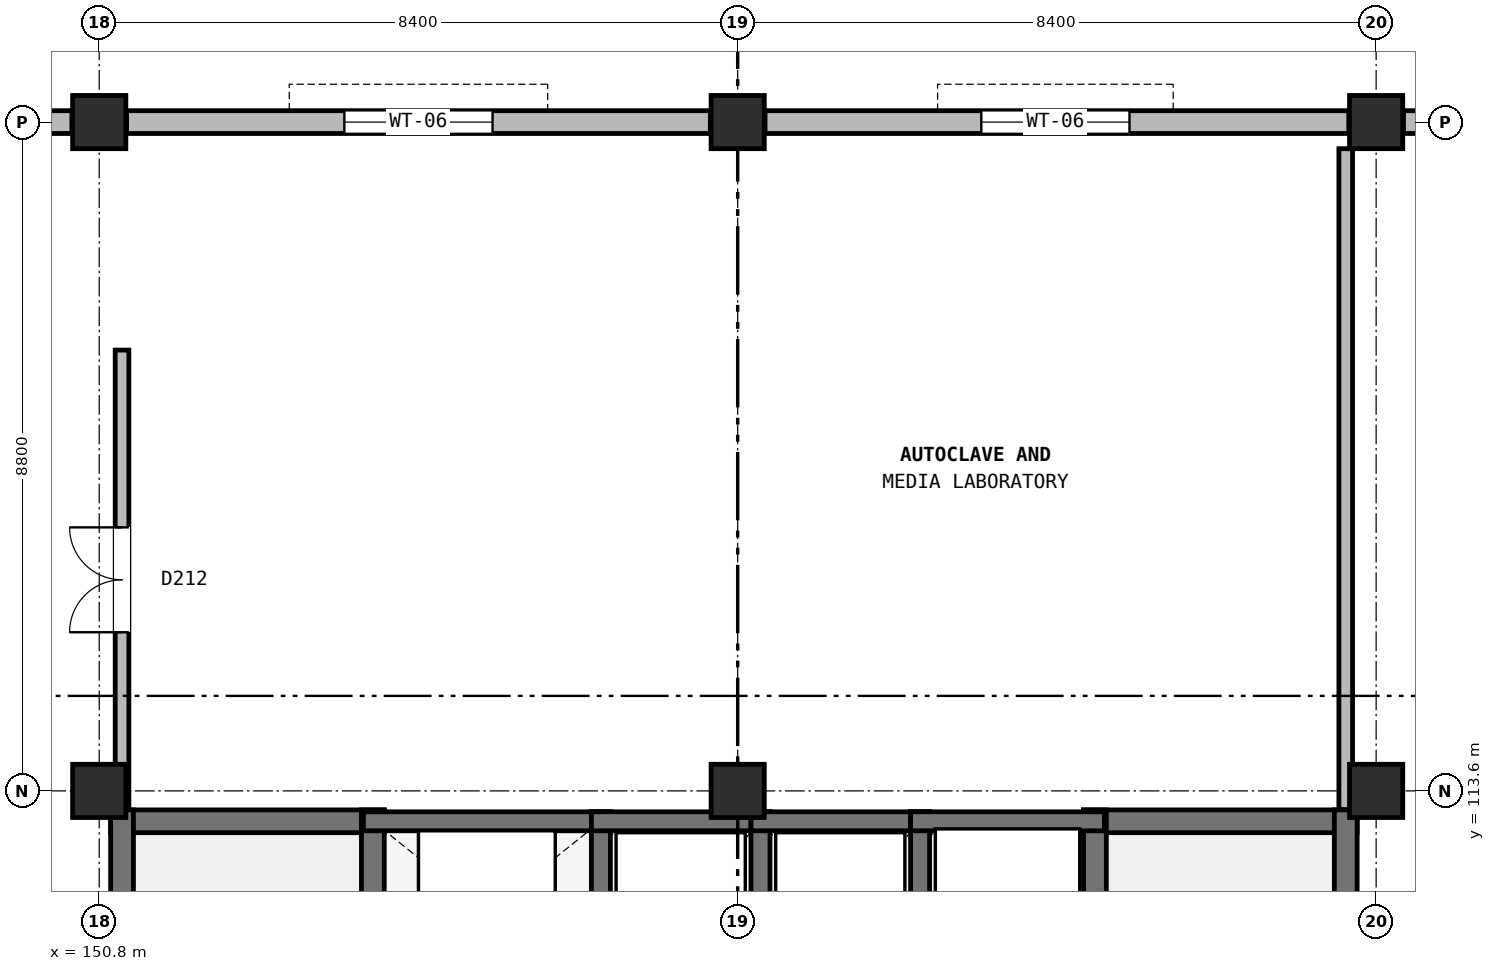
"""IFC4 building model, lengths in metres.
Left out: names, types, materials, properties, quantities, classifications, styles, units other than length and angle.
Written with IfcOpenShell. Run it as: python <this file> out.ifc"""

import sys

from ifc_helpers import new_model, si_unit, direction, frame, frame_2d, origin, origin_2d, place, context, subcontext, project, spatial, rectangle, extrude, element, fill, save


model = new_model("IFC4")
c1 = context("Model", 3, precision=1e-05, world=origin(), true_north=direction((0.0, 1.0)))
c2 = subcontext(c1, "Body", "Model", "MODEL_VIEW")
j1 = project(units=[si_unit("LENGTHUNIT", "METRE"), si_unit("PLANEANGLEUNIT", "RADIAN")], contexts=[c1])
p1 = place(None, origin())
s1 = spatial("IfcSite", under=j1, at=p1, CompositionType="ELEMENT")
p2 = place(p1, origin())
s2 = spatial("IfcBuilding", under=s1, at=p2, CompositionType="ELEMENT")
p3 = place(p2, frame((0.0, 0.0, 21.0)))
s3 = spatial("IfcBuildingStorey", under=s2, at=p3, CompositionType="ELEMENT", Elevation=21.0)
for number, where, z_axis, x_axis in (
    (1, (150.8, 113.6, 0.0), (0.0, 0.0, 1.0), (1.0, 0.0, 0.0)),
    (2, (150.8, 122.4, 0.0), (0.0, 0.0, 1.0), (1.0, 0.0, 0.0)),
    (3, (159.2, 113.6, 0.0), (0.0, 0.0, 1.0), (1.0, 0.0, 0.0)),
    (4, (159.2, 122.4, 0.0), (0.0, 0.0, 1.0), (1.0, 0.0, 0.0)),
    (5, (167.6, 113.6, 0.0), (0.0, 0.0, 1.0), (1.0, 0.0, 0.0)),
    (6, (167.6, 122.4, 0.0), (0.0, 0.0, 1.0), (1.0, 0.0, 0.0)),
):
    element("IfcColumn", number, at=place(p3, frame(where, z_axis=z_axis, x_axis=x_axis)), inside=s3, PredefinedType="COLUMN", context=c2, shape_type="SweptSolid", body=[
        extrude(rectangle(XDim=0.7, YDim=0.7, at=origin_2d()), origin(), (0.0, 0.0, 1.0), 3.8),
    ])
p4 = place(p3, frame((175.64, 122.4, 0.0), z_axis=(0.0, 0.0, 1.0), x_axis=(-1.0, 0.0, 0.0)))
e7 = element("IfcWall", 7, at=p4, inside=s3, PredefinedType="SOLIDWALL", context=c2, shape_type="SweptSolid", body=[
    extrude(rectangle(XDim=7.68, YDim=0.3, at=frame_2d((3.84, 0.0))), origin(), (0.0, 0.0, 1.0), 2.95),
])
p5 = place(p4, frame((1.045, 0.0, 0.9)))
e8 = element("IfcOpeningElement", 8, at=p5, cuts=e7, PredefinedType="OPENING", context=c2, shape_type="SweptSolid", body=[
    extrude(rectangle(XDim=1.95, YDim=1.9, at=frame_2d((0.975, 0.95))), frame((0.0, 0.16, 0.0), z_axis=(0.0, -1.0, 0.0), x_axis=(1.0, 0.0, 0.0)), (0.0, 0.0, 1.0), 0.32),
])
p6 = place(p3, frame((167.24, 122.4, 0.0), z_axis=(0.0, 0.0, 1.0), x_axis=(-1.0, 0.0, 0.0)))
e9 = element("IfcWall", 9, at=p6, inside=s3, PredefinedType="SOLIDWALL", context=c2, shape_type="SweptSolid", body=[
    extrude(rectangle(XDim=7.68, YDim=0.3, at=frame_2d((3.84, 0.0))), origin(), (0.0, 0.0, 1.0), 2.95),
])
p7 = place(p6, frame((2.885, 0.0, 0.9)))
e10 = element("IfcOpeningElement", 10, at=p7, cuts=e9, PredefinedType="OPENING", context=c2, shape_type="SweptSolid", body=[
    extrude(rectangle(XDim=1.95, YDim=1.9, at=frame_2d((0.975, 0.95))), frame((0.0, 0.16, 0.0), z_axis=(0.0, -1.0, 0.0), x_axis=(1.0, 0.0, 0.0)), (0.0, 0.0, 1.0), 0.32),
])
p8 = place(p3, frame((158.84, 122.4, 0.0), z_axis=(0.0, 0.0, 1.0), x_axis=(-1.0, 0.0, 0.0)))
e11 = element("IfcWall", 11, at=p8, inside=s3, PredefinedType="SOLIDWALL", context=c2, shape_type="SweptSolid", body=[
    extrude(rectangle(XDim=7.68, YDim=0.3, at=frame_2d((3.84, 0.0))), origin(), (0.0, 0.0, 1.0), 2.95),
])
p9 = place(p8, frame((2.865, 0.0, 0.9)))
e12 = element("IfcOpeningElement", 12, at=p9, cuts=e11, PredefinedType="OPENING", context=c2, shape_type="SweptSolid", body=[
    extrude(rectangle(XDim=1.95, YDim=1.9, at=frame_2d((0.975, 0.95))), frame((0.0, 0.16, 0.0), z_axis=(0.0, -1.0, 0.0), x_axis=(1.0, 0.0, 0.0)), (0.0, 0.0, 1.0), 0.32),
])
p10 = place(p3, frame((150.44, 122.4, 0.0), z_axis=(0.0, 0.0, 1.0), x_axis=(-1.0, 0.0, 0.0)))
e13 = element("IfcWall", 13, at=p10, inside=s3, PredefinedType="SOLIDWALL", context=c2, shape_type="SweptSolid", body=[
    extrude(rectangle(XDim=7.68, YDim=0.3, at=frame_2d((3.84, 0.0))), origin(), (0.0, 0.0, 1.0), 2.95),
])
p11 = place(p10, frame((2.865, 0.0, 0.9)))
e14 = element("IfcOpeningElement", 14, at=p11, cuts=e13, PredefinedType="OPENING", context=c2, shape_type="SweptSolid", body=[
    extrude(rectangle(XDim=1.95, YDim=1.9, at=frame_2d((0.975, 0.95))), frame((0.0, 0.16, 0.0), z_axis=(0.0, -1.0, 0.0), x_axis=(1.0, 0.0, 0.0)), (0.0, 0.0, 1.0), 0.32),
])
p12 = place(p3, frame((150.95, 113.2, 0.0), z_axis=(0.0, 0.0, 1.0), x_axis=(1.0, 0.0, 0.0)))
e15 = element("IfcWall", 15, at=p12, inside=s3, PredefinedType="SHEAR", context=c2, shape_type="SweptSolid", body=[
    extrude(rectangle(XDim=3.6, YDim=0.3, at=frame_2d((1.8, 0.0))), origin(), (0.0, 0.0, 1.0), 3.8),
])
p13 = place(p3, frame((151.1, 105.05, 0.0), z_axis=(0.0, 0.0, 1.0), x_axis=(0.0, 1.0, 0.0)))
e16 = element("IfcWall", 16, at=p13, inside=s3, PredefinedType="SHEAR", context=c2, shape_type="SweptSolid", body=[
    extrude(rectangle(XDim=8.3, YDim=0.3, at=frame_2d((4.15, 0.0))), origin(), (0.0, 0.0, 1.0), 3.8),
])
p14 = place(p3, frame((154.4, 105.05, 0.0), z_axis=(0.0, 0.0, 1.0), x_axis=(0.0, 1.0, 0.0)))
e17 = element("IfcWall", 17, at=p14, inside=s3, PredefinedType="SHEAR", context=c2, shape_type="SweptSolid", body=[
    extrude(rectangle(XDim=8.3, YDim=0.3, at=frame_2d((4.15, 0.0))), origin(), (0.0, 0.0, 1.0), 3.8),
])
p15 = place(p14, frame((0.45, 0.0, 0.0)))
e18 = element("IfcOpeningElement", 18, at=p15, cuts=e17, PredefinedType="OPENING", context=c2, shape_type="SweptSolid", body=[
    extrude(rectangle(XDim=1.1, YDim=2.2, at=frame_2d((0.55, 1.1))), frame((0.0, 0.16, 0.0), z_axis=(0.0, -1.0, 0.0), x_axis=(1.0, 0.0, 0.0)), (0.0, 0.0, 1.0), 0.32),
])
p16 = place(p3, frame((163.75, 113.2, 0.0), z_axis=(0.0, 0.0, 1.0), x_axis=(1.0, 0.0, 0.0)))
e19 = element("IfcWall", 19, at=p16, inside=s3, PredefinedType="SHEAR", context=c2, shape_type="SweptSolid", body=[
    extrude(rectangle(XDim=3.6, YDim=0.3, at=frame_2d((1.8, 0.0))), origin(), (0.0, 0.0, 1.0), 3.8),
])
for number, where, z_axis, x_axis in (
    (20, (163.9, 105.05, 0.0), (0.0, 0.0, 1.0), (0.0, 1.0, 0.0)),
    (21, (167.2, 105.05, 0.0), (0.0, 0.0, 1.0), (0.0, 1.0, 0.0)),
):
    element("IfcWall", number, at=place(p3, frame(where, z_axis=z_axis, x_axis=x_axis)), inside=s3, PredefinedType="SHEAR", context=c2, shape_type="SweptSolid", body=[
        extrude(rectangle(XDim=8.3, YDim=0.3, at=frame_2d((4.15, 0.0))), origin(), (0.0, 0.0, 1.0), 3.8),
    ])
p17 = place(p3, frame((154.275, 113.2, 0.0), z_axis=(0.0, 0.0, 1.0), x_axis=(1.0, 0.0, 0.0)))
e22 = element("IfcWall", 22, at=p17, inside=s3, PredefinedType="SOLIDWALL", context=c2, shape_type="SweptSolid", body=[
    extrude(rectangle(XDim=3.25, YDim=0.25, at=frame_2d((1.625, 0.0))), origin(), (0.0, 0.0, 1.0), 3.48),
])
p18 = place(p3, frame((157.4, 110.675, 0.0), z_axis=(0.0, 0.0, 1.0), x_axis=(0.0, 1.0, 0.0)))
e23 = element("IfcWall", 23, at=p18, inside=s3, PredefinedType="SOLIDWALL", context=c2, shape_type="SweptSolid", body=[
    extrude(rectangle(XDim=2.65, YDim=0.25, at=frame_2d((1.325, 0.0))), origin(), (0.0, 0.0, 1.0), 3.48),
])
p19 = place(p3, frame((157.275, 113.2, 0.0), z_axis=(0.0, 0.0, 1.0), x_axis=(1.0, 0.0, 0.0)))
e24 = element("IfcWall", 24, at=p19, inside=s3, PredefinedType="SOLIDWALL", context=c2, shape_type="SweptSolid", body=[
    extrude(rectangle(XDim=2.35, YDim=0.25, at=frame_2d((1.175, 0.0))), origin(), (0.0, 0.0, 1.0), 3.48),
])
p20 = place(p3, frame((159.5, 110.675, 0.0), z_axis=(0.0, 0.0, 1.0), x_axis=(0.0, 1.0, 0.0)))
e25 = element("IfcWall", 25, at=p20, inside=s3, PredefinedType="SOLIDWALL", context=c2, shape_type="SweptSolid", body=[
    extrude(rectangle(XDim=2.65, YDim=0.25, at=frame_2d((1.325, 0.0))), origin(), (0.0, 0.0, 1.0), 3.48),
])
p21 = place(p3, frame((159.375, 113.2, 0.0), z_axis=(0.0, 0.0, 1.0), x_axis=(1.0, 0.0, 0.0)))
e26 = element("IfcWall", 26, at=p21, inside=s3, PredefinedType="SOLIDWALL", context=c2, shape_type="SweptSolid", body=[
    extrude(rectangle(XDim=2.35, YDim=0.25, at=frame_2d((1.175, 0.0))), origin(), (0.0, 0.0, 1.0), 3.48),
])
p22 = place(p3, frame((161.6, 110.675, 0.0), z_axis=(0.0, 0.0, 1.0), x_axis=(0.0, 1.0, 0.0)))
e27 = element("IfcWall", 27, at=p22, inside=s3, PredefinedType="SOLIDWALL", context=c2, shape_type="SweptSolid", body=[
    extrude(rectangle(XDim=2.65, YDim=0.25, at=frame_2d((1.325, 0.0))), origin(), (0.0, 0.0, 1.0), 3.48),
])
p23 = place(p3, frame((161.475, 113.2, 0.0), z_axis=(0.0, 0.0, 1.0), x_axis=(1.0, 0.0, 0.0)))
e28 = element("IfcWall", 28, at=p23, inside=s3, PredefinedType="SOLIDWALL", context=c2, shape_type="SweptSolid", body=[
    extrude(rectangle(XDim=2.55, YDim=0.25, at=frame_2d((1.275, 0.0))), origin(), (0.0, 0.0, 1.0), 3.48),
])
p24 = place(p3, frame((151.1, 113.355, 0.0), z_axis=(0.0, 0.0, 1.0), x_axis=(0.0, 1.0, 0.0)))
e29 = element("IfcWall", 29, at=p24, inside=s3, PredefinedType="PARTITIONING", context=c2, shape_type="SweptSolid", body=[
    extrude(rectangle(XDim=6.045, YDim=0.18, at=frame_2d((3.022, 0.0))), origin(), (0.0, 0.0, 1.0), 2.945),
])
p25 = place(p24, frame((2.333, 0.0, 0.0)))
e30 = element("IfcOpeningElement", 30, at=p25, cuts=e29, PredefinedType="OPENING", context=c2, shape_type="SweptSolid", body=[
    extrude(rectangle(XDim=1.38, YDim=2.2, at=frame_2d((0.69, 1.1))), frame((0.0, 0.1, 0.0), z_axis=(0.0, -1.0, 0.0), x_axis=(1.0, 0.0, 0.0)), (0.0, 0.0, 1.0), 0.2),
])
p26 = place(p3, frame((167.2, 113.355, 0.0), z_axis=(0.0, 0.0, 1.0), x_axis=(0.0, 1.0, 0.0)))
e31 = element("IfcWall", 31, at=p26, inside=s3, PredefinedType="PARTITIONING", context=c2, shape_type="SweptSolid", body=[
    extrude(rectangle(XDim=8.695, YDim=0.18, at=frame_2d((4.348, 0.0))), origin(), (0.0, 0.0, 1.0), 2.945),
])
p27 = place(p7, origin())
e32 = element("IfcWindow", 32, at=p27, inside=s3, PartitioningType="SINGLE_PANEL", PredefinedType="WINDOW", context=c2, shape_type="SweptSolid", body=[
    extrude(rectangle(XDim=1.95, YDim=1.9, at=frame_2d((0.975, 0.95))), frame((0.0, 0.03, 0.0), z_axis=(0.0, -1.0, 0.0), x_axis=(1.0, 0.0, 0.0)), (0.0, 0.0, 1.0), 0.06),
])
fill(e10, e32)
p28 = place(p9, origin())
e33 = element("IfcWindow", 33, at=p28, inside=s3, PartitioningType="SINGLE_PANEL", PredefinedType="WINDOW", context=c2, shape_type="SweptSolid", body=[
    extrude(rectangle(XDim=1.95, YDim=1.9, at=frame_2d((0.975, 0.95))), frame((0.0, 0.03, 0.0), z_axis=(0.0, -1.0, 0.0), x_axis=(1.0, 0.0, 0.0)), (0.0, 0.0, 1.0), 0.06),
])
fill(e12, e33)
p29 = place(p25, origin())
e34 = element("IfcDoor", 34, at=p29, inside=s3, OperationType="DOUBLE_DOOR_SINGLE_SWING", PredefinedType="DOOR", context=c2, shape_type="SweptSolid", body=[
    extrude(rectangle(XDim=1.38, YDim=2.2, at=frame_2d((0.69, 1.1))), frame((0.0, 0.025, 0.0), z_axis=(0.0, -1.0, 0.0), x_axis=(1.0, 0.0, 0.0)), (0.0, 0.0, 1.0), 0.05),
])
fill(e30, e34)
save(model, sys.argv[1])
